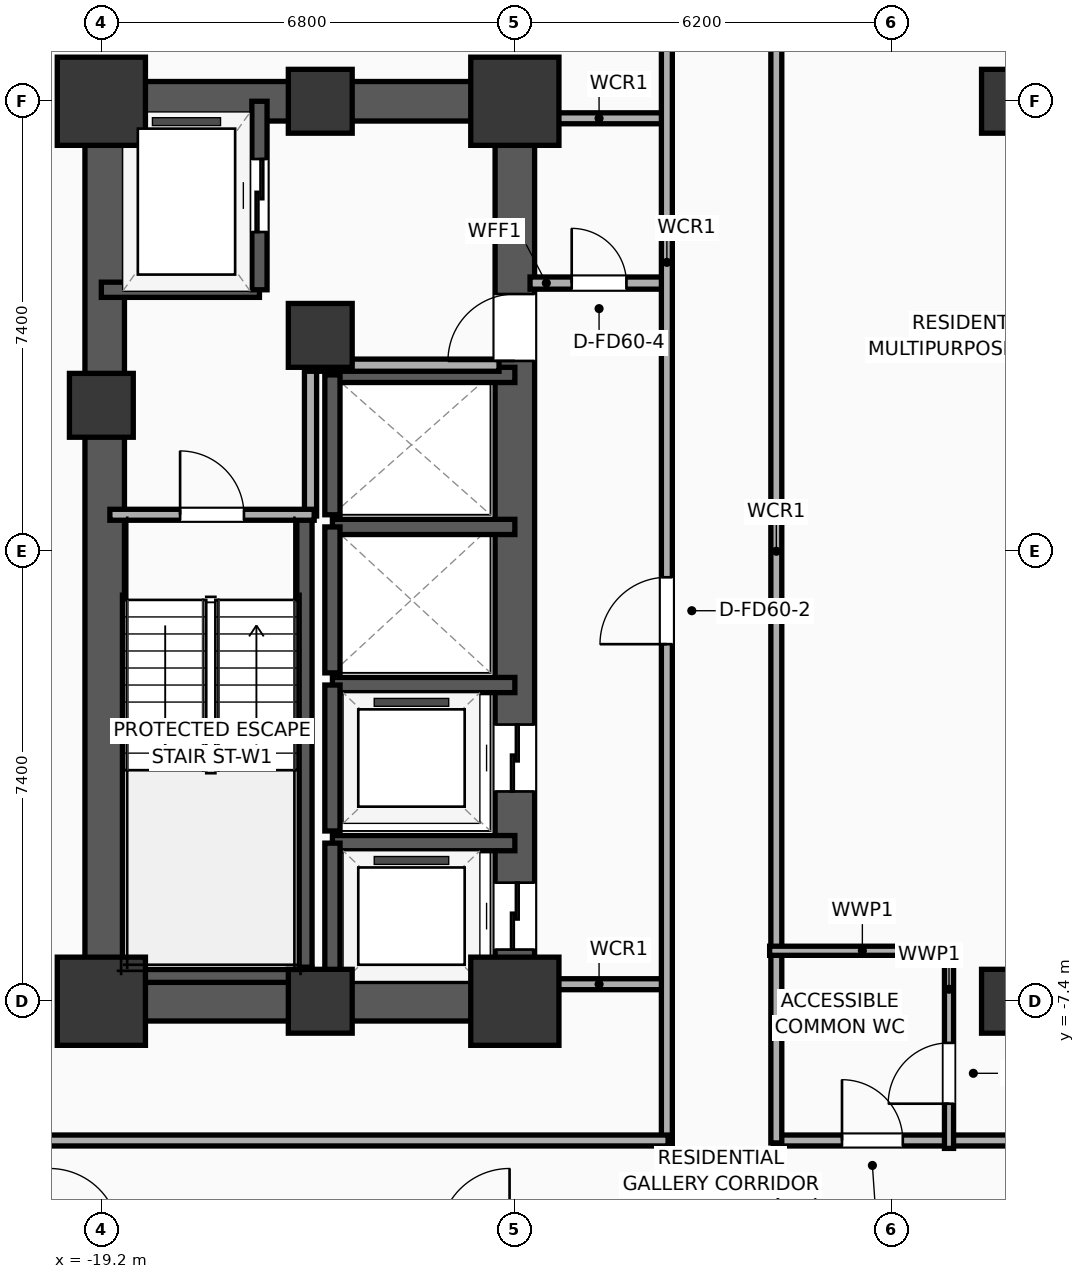
"""IFC4 building model, lengths in metres.
Left out: names, types, materials, properties, quantities, classifications, styles, units other than length and angle.
Written with IfcOpenShell. Run it as: python <this file> out.ifc"""

import sys

from ifc_helpers import new_model, si_unit, direction, frame, frame_2d, origin, origin_2d, place, context, subcontext, project, spatial, rectangle, extrude, element, fill, save


model = new_model("IFC4")
c1 = context("Model", 3, precision=1e-05, world=origin(), true_north=direction((0.0, 1.0)))
c2 = subcontext(c1, "Body", "Model", "MODEL_VIEW")
j1 = project(units=[si_unit("LENGTHUNIT", "METRE"), si_unit("PLANEANGLEUNIT", "RADIAN")], contexts=[c1])
p1 = place(None, origin())
s1 = spatial("IfcSite", under=j1, at=p1, CompositionType="ELEMENT")
p2 = place(p1, origin())
s2 = spatial("IfcBuilding", under=s1, at=p2, CompositionType="ELEMENT")
p3 = place(p2, frame((0.0, 0.0, 49.4)))
s3 = spatial("IfcBuildingStorey", under=s2, at=p3, CompositionType="ELEMENT", Elevation=49.4)
p4 = place(p3, frame((-19.2, -7.4, 0.0), z_axis=(0.0, 0.0, 1.0), x_axis=(1.0, 0.0, 0.0)))
e1 = element("IfcColumn", 1, at=p4, inside=s3, PredefinedType="COLUMN", context=c2, shape_type="SweptSolid", body=[
    extrude(rectangle(XDim=1.45, YDim=1.45, at=origin_2d()), origin(), (0.0, 0.0, 1.0), 3.9),
])
p5 = place(p3, frame((-19.2, 2.4, 0.0), z_axis=(0.0, 0.0, 1.0), x_axis=(1.0, 0.0, 0.0)))
e2 = element("IfcColumn", 2, at=p5, inside=s3, PredefinedType="COLUMN", context=c2, shape_type="SweptSolid", body=[
    extrude(rectangle(XDim=1.05, YDim=1.05, at=origin_2d()), origin(), (0.0, 0.0, 1.0), 3.9),
])
p6 = place(p3, frame((-19.2, 7.4, 0.0), z_axis=(0.0, 0.0, 1.0), x_axis=(1.0, 0.0, 0.0)))
e3 = element("IfcColumn", 3, at=p6, inside=s3, PredefinedType="COLUMN", context=c2, shape_type="SweptSolid", body=[
    extrude(rectangle(XDim=1.45, YDim=1.45, at=origin_2d()), origin(), (0.0, 0.0, 1.0), 3.9),
])
for number, where, z_axis, x_axis in (
    (4, (-15.6, -7.4, 0.0), (0.0, 0.0, 1.0), (1.0, 0.0, 0.0)),
    (5, (-15.6, 7.4, 0.0), (0.0, 0.0, 1.0), (1.0, 0.0, 0.0)),
):
    element("IfcColumn", number, at=place(p3, frame(where, z_axis=z_axis, x_axis=x_axis)), inside=s3, PredefinedType="COLUMN", context=c2, shape_type="SweptSolid", body=[
        extrude(rectangle(XDim=1.05, YDim=1.05, at=origin_2d()), origin(), (0.0, 0.0, 1.0), 3.9),
    ])
p7 = place(p3, frame((-12.4, -7.4, 0.0), z_axis=(0.0, 0.0, 1.0), x_axis=(1.0, 0.0, 0.0)))
e6 = element("IfcColumn", 6, at=p7, inside=s3, PredefinedType="COLUMN", context=c2, shape_type="SweptSolid", body=[
    extrude(rectangle(XDim=1.45, YDim=1.45, at=origin_2d()), origin(), (0.0, 0.0, 1.0), 3.9),
])
p8 = place(p3, frame((-15.6, 3.55, 0.0), z_axis=(0.0, 0.0, 1.0), x_axis=(1.0, 0.0, 0.0)))
e7 = element("IfcColumn", 7, at=p8, inside=s3, PredefinedType="COLUMN", context=c2, shape_type="SweptSolid", body=[
    extrude(rectangle(XDim=1.05, YDim=1.05, at=origin_2d()), origin(), (0.0, 0.0, 1.0), 3.9),
])
p9 = place(p3, frame((-12.4, 7.4, 0.0), z_axis=(0.0, 0.0, 1.0), x_axis=(1.0, 0.0, 0.0)))
e8 = element("IfcColumn", 8, at=p9, inside=s3, PredefinedType="COLUMN", context=c2, shape_type="SweptSolid", body=[
    extrude(rectangle(XDim=1.45, YDim=1.45, at=origin_2d()), origin(), (0.0, 0.0, 1.0), 3.9),
])
for number, where, z_axis, x_axis in (
    (9, (-19.525, -7.4, 0.0), (0.0, 0.0, 1.0), (1.0, 0.0, 0.0)),
    (10, (-19.525, 7.4, 0.0), (0.0, 0.0, 1.0), (1.0, 0.0, 0.0)),
):
    element("IfcWall", number, at=place(p3, frame(where, z_axis=z_axis, x_axis=x_axis)), inside=s3, PredefinedType="SHEAR", context=c2, shape_type="SweptSolid", body=[
        extrude(rectangle(XDim=7.45, YDim=0.65, at=frame_2d((3.725, 0.0))), origin(), (0.0, 0.0, 1.0), 3.65),
    ])
p10 = place(p3, frame((-19.145, -7.4, 0.0), z_axis=(0.0, 0.0, 1.0), x_axis=(0.0, 1.0, 0.0)))
e11 = element("IfcWall", 11, at=p10, inside=s3, PredefinedType="SHEAR", context=c2, shape_type="SweptSolid", body=[
    extrude(rectangle(XDim=14.8, YDim=0.65, at=frame_2d((7.4, 0.0))), origin(), (0.0, 0.0, 1.0), 3.65),
])
p11 = place(p3, frame((-12.4, -7.4, 0.0), z_axis=(0.0, 0.0, 1.0), x_axis=(0.0, 1.0, 0.0)))
e12 = element("IfcWall", 12, at=p11, inside=s3, PredefinedType="SHEAR", context=c2, shape_type="SweptSolid", body=[
    extrude(rectangle(XDim=14.8, YDim=0.65, at=frame_2d((7.4, 0.0))), origin(), (0.0, 0.0, 1.0), 3.65),
])
p12 = place(p11, frame((0.85, 0.0, 0.0)))
e13 = element("IfcOpeningElement", 13, at=p12, cuts=e12, PredefinedType="OPENING", context=c2, shape_type="SweptSolid", body=[
    extrude(rectangle(XDim=1.1, YDim=2.05, at=frame_2d((0.55, 1.025))), frame((0.0, 0.335, 0.0), z_axis=(0.0, -1.0, 0.0), x_axis=(1.0, 0.0, 0.0)), (0.0, 0.0, 1.0), 0.67),
])
p13 = place(p11, frame((3.45, 0.0, 0.0)))
e14 = element("IfcOpeningElement", 14, at=p13, cuts=e12, PredefinedType="OPENING", context=c2, shape_type="SweptSolid", body=[
    extrude(rectangle(XDim=1.1, YDim=2.05, at=frame_2d((0.55, 1.025))), frame((0.0, 0.335, 0.0), z_axis=(0.0, -1.0, 0.0), x_axis=(1.0, 0.0, 0.0)), (0.0, 0.0, 1.0), 0.67),
])
p14 = place(p11, frame((10.53, 0.0, 0.0)))
e15 = element("IfcOpeningElement", 15, at=p14, cuts=e12, PredefinedType="OPENING", context=c2, shape_type="SweptSolid", body=[
    extrude(rectangle(XDim=1.1, YDim=2.05, at=frame_2d((0.55, 1.025))), frame((0.0, 0.335, 0.0), z_axis=(0.0, -1.0, 0.0), x_axis=(1.0, 0.0, 0.0)), (0.0, 0.0, 1.0), 0.67),
])
p15 = place(p3, frame((-15.86, -7.085, 0.0), z_axis=(0.0, 0.0, 1.0), x_axis=(0.0, 1.0, 0.0)))
e16 = element("IfcWall", 16, at=p15, inside=s3, PredefinedType="SOLIDWALL", context=c2, shape_type="SweptSolid", body=[
    extrude(rectangle(XDim=7.685, YDim=0.25, at=frame_2d((3.843, 0.0))), origin(), (0.0, 0.0, 1.0), 3.65),
])
p16 = place(p3, frame((-19.2, -6.965, 0.0), z_axis=(0.0, 0.0, 1.0), x_axis=(1.0, 0.0, 0.0)))
e17 = element("IfcWall", 17, at=p16, inside=s3, PredefinedType="SOLIDWALL", context=c2, shape_type="SweptSolid", body=[
    extrude(rectangle(XDim=3.46, YDim=0.25, at=frame_2d((1.73, 0.0))), origin(), (0.0, 0.0, 1.0), 3.65),
])
for number, where, z_axis, x_axis in (
    (18, (-4.2, -7.4, 0.0), (0.0, 0.0, 1.0), (1.0, 0.0, 0.0)),
    (19, (-4.2, 7.4, 0.0), (0.0, 0.0, 1.0), (1.0, 0.0, 0.0)),
):
    element("IfcColumn", number, at=place(p3, frame(where, z_axis=z_axis, x_axis=x_axis)), inside=s3, PredefinedType="COLUMN", context=c2, shape_type="SweptSolid", body=[
        extrude(rectangle(XDim=1.05, YDim=1.05, at=origin_2d()), origin(), (0.0, 0.0, 1.0), 3.9),
    ])
p17 = place(p3, frame((-19.2, 4.3, 0.0), z_axis=(0.0, 0.0, 1.0), x_axis=(1.0, 0.0, 0.0)))
e20 = element("IfcWall", 20, at=p17, inside=s3, PredefinedType="SOLIDWALL", context=c2, shape_type="SweptSolid", body=[
    extrude(rectangle(XDim=2.6, YDim=0.25, at=frame_2d((1.3, 0.0))), origin(), (0.0, 0.0, 1.0), 3.65),
])
p18 = place(p3, frame((-16.6, 4.3, 0.0), z_axis=(0.0, 0.0, 1.0), x_axis=(0.0, 1.0, 0.0)))
e21 = element("IfcWall", 21, at=p18, inside=s3, PredefinedType="SOLIDWALL", context=c2, shape_type="SweptSolid", body=[
    extrude(rectangle(XDim=3.1, YDim=0.25, at=frame_2d((1.55, 0.0))), origin(), (0.0, 0.0, 1.0), 3.65),
])
p19 = place(p18, frame((0.95, 0.0, 0.0)))
e22 = element("IfcOpeningElement", 22, at=p19, cuts=e21, PredefinedType="OPENING", context=c2, shape_type="SweptSolid", body=[
    extrude(rectangle(XDim=1.2, YDim=2.05, at=frame_2d((0.6, 1.025))), frame((0.0, 0.135, 0.0), z_axis=(0.0, -1.0, 0.0), x_axis=(1.0, 0.0, 0.0)), (0.0, 0.0, 1.0), 0.27),
])
p20 = place(p3, frame((-12.4, -4.8, 0.0), z_axis=(0.0, 0.0, 1.0), x_axis=(-1.0, 0.0, 0.0)))
e23 = element("IfcWall", 23, at=p20, inside=s3, PredefinedType="SOLIDWALL", context=c2, shape_type="SweptSolid", body=[
    extrude(rectangle(XDim=3.0, YDim=0.25, at=frame_2d((1.5, 0.0))), origin(), (0.0, 0.0, 1.0), 3.65),
])
p21 = place(p3, frame((-15.4, -4.8, 0.0), z_axis=(0.0, 0.0, 1.0), x_axis=(0.0, -1.0, 0.0)))
e24 = element("IfcWall", 24, at=p21, inside=s3, PredefinedType="SOLIDWALL", context=c2, shape_type="SweptSolid", body=[
    extrude(rectangle(XDim=2.6, YDim=0.25, at=frame_2d((1.3, 0.0))), origin(), (0.0, 0.0, 1.0), 3.65),
])
p22 = place(p3, frame((-12.4, -2.2, 0.0), z_axis=(0.0, 0.0, 1.0), x_axis=(-1.0, 0.0, 0.0)))
e25 = element("IfcWall", 25, at=p22, inside=s3, PredefinedType="SOLIDWALL", context=c2, shape_type="SweptSolid", body=[
    extrude(rectangle(XDim=3.0, YDim=0.25, at=frame_2d((1.5, 0.0))), origin(), (0.0, 0.0, 1.0), 3.65),
])
p23 = place(p3, frame((-15.4, -2.2, 0.0), z_axis=(0.0, 0.0, 1.0), x_axis=(0.0, -1.0, 0.0)))
e26 = element("IfcWall", 26, at=p23, inside=s3, PredefinedType="SOLIDWALL", context=c2, shape_type="SweptSolid", body=[
    extrude(rectangle(XDim=2.4, YDim=0.25, at=frame_2d((1.2, 0.0))), origin(), (0.0, 0.0, 1.0), 3.65),
])
p24 = place(p3, frame((-12.4, 0.4, 0.0), z_axis=(0.0, 0.0, 1.0), x_axis=(-1.0, 0.0, 0.0)))
e27 = element("IfcWall", 27, at=p24, inside=s3, PredefinedType="SOLIDWALL", context=c2, shape_type="SweptSolid", body=[
    extrude(rectangle(XDim=3.0, YDim=0.25, at=frame_2d((1.5, 0.0))), origin(), (0.0, 0.0, 1.0), 3.65),
])
p25 = place(p3, frame((-15.4, 0.4, 0.0), z_axis=(0.0, 0.0, 1.0), x_axis=(0.0, -1.0, 0.0)))
e28 = element("IfcWall", 28, at=p25, inside=s3, PredefinedType="SOLIDWALL", context=c2, shape_type="SweptSolid", body=[
    extrude(rectangle(XDim=2.4, YDim=0.25, at=frame_2d((1.2, 0.0))), origin(), (0.0, 0.0, 1.0), 3.65),
])
p26 = place(p3, frame((-12.4, 2.9, 0.0), z_axis=(0.0, 0.0, 1.0), x_axis=(-1.0, 0.0, 0.0)))
e29 = element("IfcWall", 29, at=p26, inside=s3, PredefinedType="SOLIDWALL", context=c2, shape_type="SweptSolid", body=[
    extrude(rectangle(XDim=3.0, YDim=0.25, at=frame_2d((1.5, 0.0))), origin(), (0.0, 0.0, 1.0), 3.65),
])
p27 = place(p3, frame((-15.4, 2.9, 0.0), z_axis=(0.0, 0.0, 1.0), x_axis=(0.0, -1.0, 0.0)))
e30 = element("IfcWall", 30, at=p27, inside=s3, PredefinedType="SOLIDWALL", context=c2, shape_type="SweptSolid", body=[
    extrude(rectangle(XDim=2.3, YDim=0.25, at=frame_2d((1.15, 0.0))), origin(), (0.0, 0.0, 1.0), 3.65),
])
p28 = place(p3, frame((-15.76, 0.58, 0.0), z_axis=(0.0, 0.0, 1.0), x_axis=(0.0, 1.0, 0.0)))
e31 = element("IfcWall", 31, at=p28, inside=s3, PredefinedType="PARTITIONING", context=c2, shape_type="SweptSolid", body=[
    extrude(rectangle(XDim=2.52, YDim=0.2, at=frame_2d((1.26, 0.0))), origin(), (0.0, 0.0, 1.0), 3.65),
])
p29 = place(p3, frame((-15.82, 3.06, 0.0), z_axis=(0.0, 0.0, 1.0), x_axis=(1.0, 0.0, 0.0)))
e32 = element("IfcWall", 32, at=p29, inside=s3, PredefinedType="PARTITIONING", context=c2, shape_type="SweptSolid", body=[
    extrude(rectangle(XDim=3.16, YDim=0.2, at=frame_2d((1.58, 0.0))), origin(), (0.0, 0.0, 1.0), 3.65),
])
p30 = place(p3, frame((-19.06, 0.6, 0.0), z_axis=(0.0, 0.0, 1.0), x_axis=(1.0, 0.0, 0.0)))
e33 = element("IfcWall", 33, at=p30, inside=s3, PredefinedType="PARTITIONING", context=c2, shape_type="SweptSolid", body=[
    extrude(rectangle(XDim=3.36, YDim=0.18, at=frame_2d((1.68, 0.0))), origin(), (0.0, 0.0, 1.0), 3.65),
])
p31 = place(p30, frame((1.155, 0.0, 0.0)))
e34 = element("IfcOpeningElement", 34, at=p31, cuts=e33, PredefinedType="OPENING", context=c2, shape_type="SweptSolid", body=[
    extrude(rectangle(XDim=1.05, YDim=2.05, at=frame_2d((0.525, 1.025))), frame((0.0, 0.1, 0.0), z_axis=(0.0, -1.0, 0.0), x_axis=(1.0, 0.0, 0.0)), (0.0, 0.0, 1.0), 0.2),
])
p32 = place(p3, frame((-12.15, 4.41, 0.0), z_axis=(0.0, 0.0, 1.0), x_axis=(1.0, 0.0, 0.0)))
e35 = element("IfcWall", 35, at=p32, inside=s3, PredefinedType="PARTITIONING", context=c2, shape_type="SweptSolid", body=[
    extrude(rectangle(XDim=2.27, YDim=0.2, at=frame_2d((1.135, 0.0))), origin(), (0.0, 0.0, 1.0), 3.65),
])
p33 = place(p32, frame((0.685, 0.0, 0.0)))
e36 = element("IfcOpeningElement", 36, at=p33, cuts=e35, PredefinedType="OPENING", context=c2, shape_type="SweptSolid", body=[
    extrude(rectangle(XDim=0.9, YDim=2.05, at=frame_2d((0.45, 1.025))), frame((0.0, 0.11, 0.0), z_axis=(0.0, -1.0, 0.0), x_axis=(1.0, 0.0, 0.0)), (0.0, 0.0, 1.0), 0.22),
])
for number, where, z_axis, x_axis in (
    (37, (-12.15, 7.12, 0.0), (0.0, 0.0, 1.0), (1.0, 0.0, 0.0)),
    (38, (-12.15, -7.12, 0.0), (0.0, 0.0, 1.0), (1.0, 0.0, 0.0)),
):
    element("IfcWall", number, at=place(p3, frame(where, z_axis=z_axis, x_axis=x_axis)), inside=s3, PredefinedType="PARTITIONING", context=c2, shape_type="SweptSolid", body=[
        extrude(rectangle(XDim=2.27, YDim=0.18, at=frame_2d((1.135, 0.0))), origin(), (0.0, 0.0, 1.0), 2.94),
    ])
p34 = place(p3, frame((-9.9, -9.78, 0.0), z_axis=(0.0, 0.0, 1.0), x_axis=(0.0, 1.0, 0.0)))
e39 = element("IfcWall", 39, at=p34, inside=s3, PredefinedType="PARTITIONING", context=c2, shape_type="SweptSolid", body=[
    extrude(rectangle(XDim=19.56, YDim=0.18, at=frame_2d((9.78, 0.0))), origin(), (0.0, 0.0, 1.0), 3.65),
])
p35 = place(p34, frame((8.252, 0.0, 0.0)))
e40 = element("IfcOpeningElement", 40, at=p35, cuts=e39, PredefinedType="OPENING", context=c2, shape_type="SweptSolid", body=[
    extrude(rectangle(XDim=1.1, YDim=2.05, at=frame_2d((0.55, 1.025))), frame((0.0, 0.1, 0.0), z_axis=(0.0, -1.0, 0.0), x_axis=(1.0, 0.0, 0.0)), (0.0, 0.0, 1.0), 0.2),
])
p36 = place(p3, frame((-33.41, -9.69, 0.0), z_axis=(0.0, 0.0, 1.0), x_axis=(1.0, 0.0, 0.0)))
e41 = element("IfcWall", 41, at=p36, inside=s3, PredefinedType="PARTITIONING", context=c2, shape_type="SweptSolid", body=[
    extrude(rectangle(XDim=23.53, YDim=0.18, at=frame_2d((11.765, 0.0))), origin(), (0.0, 0.0, 1.0), 3.65),
])
p37 = place(p3, frame((-8.15, -9.69, 0.0), z_axis=(0.0, 0.0, 1.0), x_axis=(1.0, 0.0, 0.0)))
e42 = element("IfcWall", 42, at=p37, inside=s3, PredefinedType="PARTITIONING", context=c2, shape_type="SweptSolid", body=[
    extrude(rectangle(XDim=16.3, YDim=0.18, at=frame_2d((8.15, 0.0))), origin(), (0.0, 0.0, 1.0), 3.65),
])
p38 = place(p37, frame((1.13, 0.0, 0.0)))
e43 = element("IfcOpeningElement", 43, at=p38, cuts=e42, PredefinedType="OPENING", context=c2, shape_type="SweptSolid", body=[
    extrude(rectangle(XDim=1.0, YDim=2.05, at=frame_2d((0.5, 1.025))), frame((0.0, 0.1, 0.0), z_axis=(0.0, -1.0, 0.0), x_axis=(1.0, 0.0, 0.0)), (0.0, 0.0, 1.0), 0.2),
])
p39 = place(p37, frame((10.12, 0.0, 0.0)))
e44 = element("IfcOpeningElement", 44, at=p39, cuts=e42, PredefinedType="OPENING", context=c2, shape_type="SweptSolid", body=[
    extrude(rectangle(XDim=0.95, YDim=2.05, at=frame_2d((0.475, 1.025))), frame((0.0, 0.1, 0.0), z_axis=(0.0, -1.0, 0.0), x_axis=(1.0, 0.0, 0.0)), (0.0, 0.0, 1.0), 0.2),
])
p40 = place(p3, frame((-8.1, -9.73, 0.0), z_axis=(0.0, 0.0, 1.0), x_axis=(0.0, 1.0, 0.0)))
e45 = element("IfcWall", 45, at=p40, inside=s3, PredefinedType="PARTITIONING", context=c2, shape_type="SweptSolid", body=[
    extrude(rectangle(XDim=19.46, YDim=0.18, at=frame_2d((9.73, 0.0))), origin(), (0.0, 0.0, 1.0), 3.65),
])
p41 = place(p3, frame((-5.26, -9.82, 0.0), z_axis=(0.0, 0.0, 1.0), x_axis=(0.0, 1.0, 0.0)))
e46 = element("IfcWall", 46, at=p41, inside=s3, PredefinedType="PLUMBINGWALL", context=c2, shape_type="SweptSolid", body=[
    extrude(rectangle(XDim=3.35, YDim=0.15, at=frame_2d((1.675, 0.0))), origin(), (0.0, 0.0, 1.0), 3.65),
])
p42 = place(p41, frame((0.735, 0.0, 0.0)))
e47 = element("IfcOpeningElement", 47, at=p42, cuts=e46, PredefinedType="OPENING", context=c2, shape_type="SweptSolid", body=[
    extrude(rectangle(XDim=1.0, YDim=2.05, at=frame_2d((0.5, 1.025))), frame((0.0, 0.085, 0.0), z_axis=(0.0, -1.0, 0.0), x_axis=(1.0, 0.0, 0.0)), (0.0, 0.0, 1.0), 0.17),
])
p43 = place(p3, frame((-8.21, -6.57, 0.0), z_axis=(0.0, 0.0, 1.0), x_axis=(1.0, 0.0, 0.0)))
e48 = element("IfcWall", 48, at=p43, inside=s3, PredefinedType="PLUMBINGWALL", context=c2, shape_type="SweptSolid", body=[
    extrude(rectangle(XDim=3.05, YDim=0.15, at=frame_2d((1.525, 0.0))), origin(), (0.0, 0.0, 1.0), 3.65),
])
p44 = place(p19, origin())
e49 = element("IfcDoor", 49, at=p44, inside=s3, OperationType="SLIDING_TO_LEFT", PredefinedType="DOOR", context=c2, shape_type="SweptSolid", body=[
    extrude(rectangle(XDim=1.2, YDim=2.05, at=frame_2d((0.6, 1.025))), frame((0.0, 0.025, 0.0), z_axis=(0.0, -1.0, 0.0), x_axis=(1.0, 0.0, 0.0)), (0.0, 0.0, 1.0), 0.05),
])
fill(e22, e49)
p45 = place(p12, origin())
e50 = element("IfcDoor", 50, at=p45, inside=s3, OperationType="SLIDING_TO_LEFT", PredefinedType="DOOR", context=c2, shape_type="SweptSolid", body=[
    extrude(rectangle(XDim=1.1, YDim=2.05, at=frame_2d((0.55, 1.025))), frame((0.0, 0.025, 0.0), z_axis=(0.0, -1.0, 0.0), x_axis=(1.0, 0.0, 0.0)), (0.0, 0.0, 1.0), 0.05),
])
fill(e13, e50)
p46 = place(p13, origin())
e51 = element("IfcDoor", 51, at=p46, inside=s3, OperationType="SLIDING_TO_LEFT", PredefinedType="DOOR", context=c2, shape_type="SweptSolid", body=[
    extrude(rectangle(XDim=1.1, YDim=2.05, at=frame_2d((0.55, 1.025))), frame((0.0, 0.025, 0.0), z_axis=(0.0, -1.0, 0.0), x_axis=(1.0, 0.0, 0.0)), (0.0, 0.0, 1.0), 0.05),
])
fill(e14, e51)
p47 = place(p31, origin())
e52 = element("IfcDoor", 52, at=p47, inside=s3, OperationType="SINGLE_SWING_LEFT", PredefinedType="DOOR", context=c2, shape_type="SweptSolid", body=[
    extrude(rectangle(XDim=1.05, YDim=2.05, at=frame_2d((0.525, 1.025))), frame((0.0, 0.025, 0.0), z_axis=(0.0, -1.0, 0.0), x_axis=(1.0, 0.0, 0.0)), (0.0, 0.0, 1.0), 0.05),
])
fill(e34, e52)
p48 = place(p33, origin())
e53 = element("IfcDoor", 53, at=p48, inside=s3, OperationType="SINGLE_SWING_LEFT", PredefinedType="DOOR", context=c2, shape_type="SweptSolid", body=[
    extrude(rectangle(XDim=0.9, YDim=2.05, at=frame_2d((0.45, 1.025))), frame((0.0, 0.025, 0.0), z_axis=(0.0, -1.0, 0.0), x_axis=(1.0, 0.0, 0.0)), (0.0, 0.0, 1.0), 0.05),
])
fill(e36, e53)
p49 = place(p35, origin())
e54 = element("IfcDoor", 54, at=p49, inside=s3, OperationType="SINGLE_SWING_LEFT", PredefinedType="DOOR", context=c2, shape_type="SweptSolid", body=[
    extrude(rectangle(XDim=1.1, YDim=2.05, at=frame_2d((0.55, 1.025))), frame((0.0, 0.025, 0.0), z_axis=(0.0, -1.0, 0.0), x_axis=(1.0, 0.0, 0.0)), (0.0, 0.0, 1.0), 0.05),
])
fill(e40, e54)
p50 = place(p38, origin())
e55 = element("IfcDoor", 55, at=p50, inside=s3, OperationType="SINGLE_SWING_LEFT", PredefinedType="DOOR", context=c2, shape_type="SweptSolid", body=[
    extrude(rectangle(XDim=1.0, YDim=2.05, at=frame_2d((0.5, 1.025))), frame((0.0, 0.025, 0.0), z_axis=(0.0, -1.0, 0.0), x_axis=(1.0, 0.0, 0.0)), (0.0, 0.0, 1.0), 0.05),
])
fill(e43, e55)
p51 = place(p42, origin())
e56 = element("IfcDoor", 56, at=p51, inside=s3, OperationType="SINGLE_SWING_LEFT", PredefinedType="DOOR", context=c2, shape_type="SweptSolid", body=[
    extrude(rectangle(XDim=1.0, YDim=2.05, at=frame_2d((0.5, 1.025))), frame((0.0, 0.025, 0.0), z_axis=(0.0, -1.0, 0.0), x_axis=(1.0, 0.0, 0.0)), (0.0, 0.0, 1.0), 0.05),
])
fill(e47, e56)
p52 = place(p14, origin())
e57 = element("IfcDoor", 57, at=p52, inside=s3, OperationType="SINGLE_SWING_LEFT", PredefinedType="DOOR", context=c2, shape_type="SweptSolid", body=[
    extrude(rectangle(XDim=1.1, YDim=2.05, at=frame_2d((0.55, 1.025))), frame((0.0, 0.025, 0.0), z_axis=(0.0, -1.0, 0.0), x_axis=(1.0, 0.0, 0.0)), (0.0, 0.0, 1.0), 0.05),
])
fill(e15, e57)
save(model, sys.argv[1])
